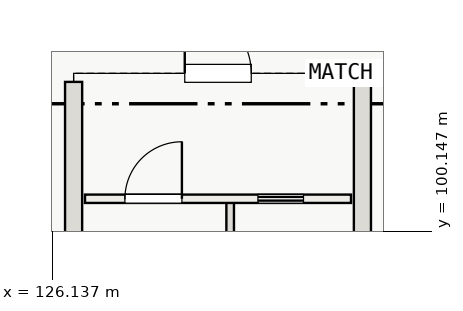
"""IFC4 building model, lengths in metres.
Left out: names, types, materials, properties, quantities, classifications, styles, units other than length and angle.
Written with IfcOpenShell. Run it as: python <this file> out.ifc"""

import sys

from ifc_helpers import new_model, si_unit, direction, frame, frame_2d, origin, place, context, subcontext, project, spatial, rectangle, extrude, element, fill, save


model = new_model("IFC4")
c1 = context("Model", 3, precision=1e-05, world=origin(), true_north=direction((0.0, 1.0)))
c2 = subcontext(c1, "Body", "Model", "MODEL_VIEW")
j1 = project(units=[si_unit("LENGTHUNIT", "METRE"), si_unit("PLANEANGLEUNIT", "RADIAN")], contexts=[c1])
p1 = place(None, origin())
s1 = spatial("IfcSite", under=j1, at=p1, CompositionType="ELEMENT")
p2 = place(p1, origin())
s2 = spatial("IfcBuilding", under=s1, at=p2, CompositionType="ELEMENT")
p3 = place(p2, frame((0.0, 0.0, 21.6)))
s3 = spatial("IfcBuildingStorey", under=s2, at=p3, CompositionType="ELEMENT", Elevation=21.6)
p4 = place(p3, frame((126.475, 104.3, 0.0), z_axis=(0.0, 0.0, 1.0), x_axis=(1.0, 0.0, 0.0)))
e1 = element("IfcWall", 1, at=p4, inside=s3, PredefinedType="SHEAR", context=c2, shape_type="SweptSolid", body=[
    extrude(rectangle(XDim=8.05, YDim=0.45, at=frame_2d((4.025, 0.0))), origin(), (0.0, 0.0, 1.0), 4.8),
])
p5 = place(p4, frame((3.15, 0.0, 0.0)))
e2 = element("IfcOpeningElement", 2, at=p5, cuts=e1, PredefinedType="OPENING", context=c2, shape_type="SweptSolid", body=[
    extrude(rectangle(XDim=1.75, YDim=2.3, at=frame_2d((0.875, 1.15))), frame((0.0, 0.235, 0.0), z_axis=(0.0, -1.0, 0.0), x_axis=(1.0, 0.0, 0.0)), (0.0, 0.0, 1.0), 0.47),
])
for number, where, z_axis, x_axis in (
    (3, (126.7, 92.925, 0.0), (0.0, 0.0, 1.0), (0.0, 1.0, 0.0)),
    (4, (134.3, 92.925, 0.0), (0.0, 0.0, 1.0), (0.0, 1.0, 0.0)),
):
    element("IfcWall", number, at=place(p3, frame(where, z_axis=z_axis, x_axis=x_axis)), inside=s3, PredefinedType="SHEAR", context=c2, shape_type="SweptSolid", body=[
        extrude(rectangle(XDim=11.15, YDim=0.45, at=frame_2d((5.575, 0.0))), origin(), (0.0, 0.0, 1.0), 4.8),
    ])
p6 = place(p3, frame((130.82, 92.95, 0.0), z_axis=(0.0, 0.0, 1.0), x_axis=(0.0, 1.0, 0.0)))
e5 = element("IfcWall", 5, at=p6, inside=s3, PredefinedType="SOLIDWALL", context=c2, shape_type="SweptSolid", body=[
    extrude(rectangle(XDim=8.0, YDim=0.2, at=frame_2d((4.0, 0.0))), origin(), (0.0, 0.0, 1.0), 4.8),
])
p7 = place(p3, frame((127.0, 101.0, 0.0), z_axis=(0.0, 0.0, 1.0), x_axis=(1.0, 0.0, 0.0)))
e6 = element("IfcWall", 6, at=p7, inside=s3, PredefinedType="SOLIDWALL", context=c2, shape_type="SweptSolid", body=[
    extrude(rectangle(XDim=7.0, YDim=0.22, at=frame_2d((3.5, 0.0))), origin(), (0.0, 0.0, 1.0), 4.53),
])
p8 = place(p7, frame((1.05, 0.0, 0.0)))
e7 = element("IfcOpeningElement", 7, at=p8, cuts=e6, PredefinedType="OPENING", context=c2, shape_type="SweptSolid", body=[
    extrude(rectangle(XDim=1.5, YDim=2.2, at=frame_2d((0.75, 1.1))), frame((0.0, 0.12, 0.0), z_axis=(0.0, -1.0, 0.0), x_axis=(1.0, 0.0, 0.0)), (0.0, 0.0, 1.0), 0.24),
])
p9 = place(p7, frame((4.55, 0.0, 0.0)))
e8 = element("IfcOpeningElement", 8, at=p9, cuts=e6, PredefinedType="OPENING", context=c2, shape_type="SweptSolid", body=[
    extrude(rectangle(XDim=1.2, YDim=2.2, at=frame_2d((0.6, 1.1))), frame((0.0, 0.12, 0.0), z_axis=(0.0, -1.0, 0.0), x_axis=(1.0, 0.0, 0.0)), (0.0, 0.0, 1.0), 0.24),
])
p10 = place(p8, origin())
e9 = element("IfcDoor", 9, at=p10, inside=s3, OperationType="SINGLE_SWING_RIGHT", PredefinedType="DOOR", context=c2, shape_type="SweptSolid", body=[
    extrude(rectangle(XDim=1.5, YDim=2.2, at=frame_2d((0.75, 1.1))), frame((0.0, 0.025, 0.0), z_axis=(0.0, -1.0, 0.0), x_axis=(1.0, 0.0, 0.0)), (0.0, 0.0, 1.0), 0.05),
])
fill(e7, e9)
p11 = place(p9, origin())
e10 = element("IfcDoor", 10, at=p11, inside=s3, OperationType="SLIDING_TO_RIGHT", PredefinedType="DOOR", context=c2, shape_type="SweptSolid", body=[
    extrude(rectangle(XDim=1.2, YDim=2.2, at=frame_2d((0.6, 1.1))), frame((0.0, 0.025, 0.0), z_axis=(0.0, -1.0, 0.0), x_axis=(1.0, 0.0, 0.0)), (0.0, 0.0, 1.0), 0.05),
])
fill(e8, e10)
p12 = place(p5, frame((1.75, 0.0, 0.0), z_axis=(0.0, 0.0, 1.0), x_axis=(-1.0, 0.0, 0.0)))
e11 = element("IfcDoor", 11, at=p12, inside=s3, OperationType="DOUBLE_DOOR_SINGLE_SWING", PredefinedType="DOOR", context=c2, shape_type="SweptSolid", body=[
    extrude(rectangle(XDim=1.75, YDim=2.3, at=frame_2d((0.875, 1.15))), frame((0.0, 0.025, 0.0), z_axis=(0.0, -1.0, 0.0), x_axis=(1.0, 0.0, 0.0)), (0.0, 0.0, 1.0), 0.05),
])
fill(e2, e11)
save(model, sys.argv[1])
